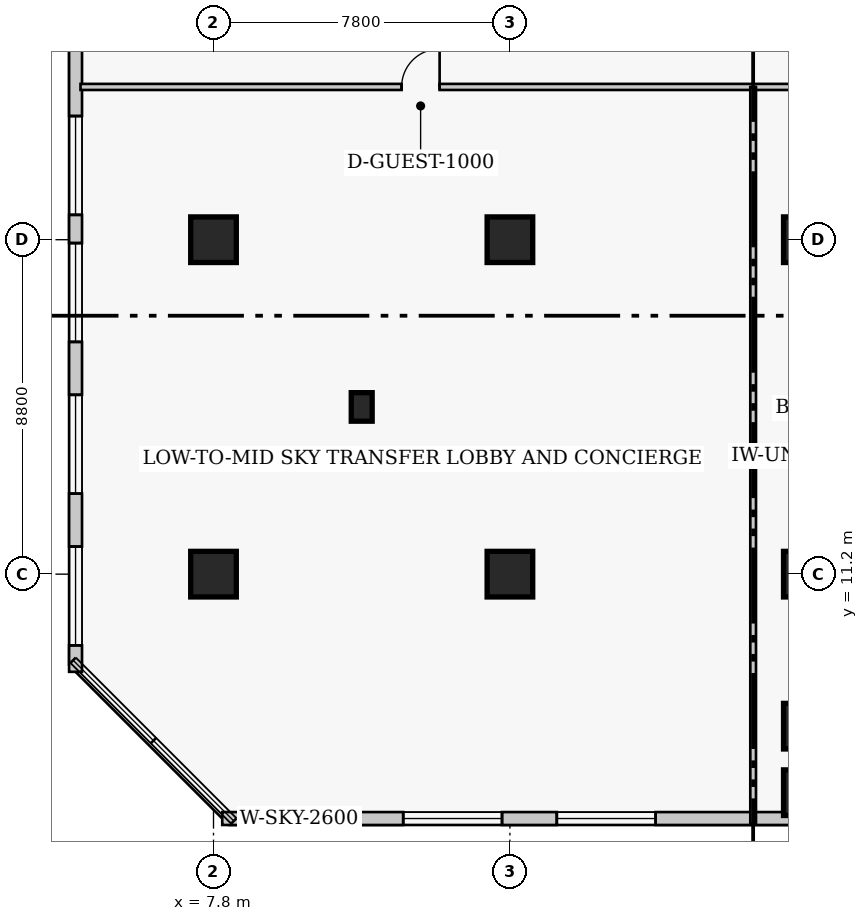
"""IFC4 building model, lengths in metres.
Left out: names, types, materials, properties, quantities, classifications, styles, units other than length and angle.
Written with IfcOpenShell. Run it as: python <this file> out.ifc"""

import sys

from ifc_helpers import new_model, si_unit, direction, frame, frame_2d, origin, origin_2d, place, context, subcontext, project, spatial, rectangle, extrude, element, fill, save


model = new_model("IFC4")
c1 = context("Model", 3, precision=1e-05, world=origin(), true_north=direction((0.0, 1.0)))
c2 = subcontext(c1, "Body", "Model", "MODEL_VIEW")
j1 = project(units=[si_unit("LENGTHUNIT", "METRE"), si_unit("PLANEANGLEUNIT", "RADIAN")], contexts=[c1])
p1 = place(None, origin())
s1 = spatial("IfcSite", under=j1, at=p1, CompositionType="ELEMENT")
p2 = place(p1, origin())
s2 = spatial("IfcBuilding", under=s1, at=p2, CompositionType="ELEMENT")
p3 = place(p2, frame((0.0, 0.0, 129.8)))
s3 = spatial("IfcBuildingStorey", under=s2, at=p3, CompositionType="ELEMENT", Elevation=129.8)
for number, where, z_axis, x_axis in (
    (1, (7.8, 11.2, 0.0), (0.0, 0.0, 1.0), (1.0, 0.0, 0.0)),
    (2, (7.8, 20.0, 0.0), (0.0, 0.0, 1.0), (1.0, 0.0, 0.0)),
    (3, (15.6, 11.2, 0.0), (0.0, 0.0, 1.0), (1.0, 0.0, 0.0)),
    (4, (15.6, 20.0, 0.0), (0.0, 0.0, 1.0), (1.0, 0.0, 0.0)),
    (5, (23.4, 11.2, 0.0), (0.0, 0.0, 1.0), (1.0, 0.0, 0.0)),
    (6, (23.4, 20.0, 0.0), (0.0, 0.0, 1.0), (1.0, 0.0, 0.0)),
    (7, (23.4, 7.2, 0.0), (0.0, 0.0, 1.0), (1.0, 0.0, 0.0)),
    (8, (23.4, 5.45, 0.0), (0.0, 0.0, 1.0), (1.0, 0.0, 0.0)),
):
    element("IfcColumn", number, at=place(p3, frame(where, z_axis=z_axis, x_axis=x_axis)), inside=s3, PredefinedType="COLUMN", context=c2, shape_type="SweptSolid", body=[
        extrude(rectangle(XDim=1.2, YDim=1.2, at=origin_2d()), origin(), (0.0, 0.0, 1.0), 4.8),
    ])
p4 = place(p3, frame((11.7, 15.6, 0.0), z_axis=(0.0, 0.0, 1.0), x_axis=(1.0, 0.0, 0.0)))
e9 = element("IfcColumn", 9, at=p4, inside=s3, PredefinedType="PILASTER", context=c2, shape_type="SweptSolid", body=[
    extrude(rectangle(XDim=0.55, YDim=0.75, at=origin_2d()), origin(), (0.0, 0.0, 1.0), 4.8),
])
p5 = place(p3, frame((8.03, 4.77, 0.0), z_axis=(0.0, 0.0, 1.0), x_axis=(1.0, 0.0, 0.0)))
e10 = element("IfcWall", 10, at=p5, inside=s3, PredefinedType="SOLIDWALL", context=c2, shape_type="SweptSolid", body=[
    extrude(rectangle(XDim=28.29, YDim=0.34, at=frame_2d((14.145, 0.0))), origin(), (0.0, 0.0, 1.0), 4.55),
])
p6 = place(p5, frame((0.721, 0.0, 0.65)))
e11 = element("IfcOpeningElement", 11, at=p6, cuts=e10, PredefinedType="OPENING", context=c2, shape_type="SweptSolid", body=[
    extrude(rectangle(XDim=2.6, YDim=2.2, at=frame_2d((1.3, 1.1))), frame((0.0, 0.18, 0.0), z_axis=(0.0, -1.0, 0.0), x_axis=(1.0, 0.0, 0.0)), (0.0, 0.0, 1.0), 0.36),
])
p7 = place(p5, frame((4.762, 0.0, 0.65)))
e12 = element("IfcOpeningElement", 12, at=p7, cuts=e10, PredefinedType="OPENING", context=c2, shape_type="SweptSolid", body=[
    extrude(rectangle(XDim=2.6, YDim=2.2, at=frame_2d((1.3, 1.1))), frame((0.0, 0.18, 0.0), z_axis=(0.0, -1.0, 0.0), x_axis=(1.0, 0.0, 0.0)), (0.0, 0.0, 1.0), 0.36),
])
p8 = place(p5, frame((8.804, 0.0, 0.65)))
e13 = element("IfcOpeningElement", 13, at=p8, cuts=e10, PredefinedType="OPENING", context=c2, shape_type="SweptSolid", body=[
    extrude(rectangle(XDim=2.6, YDim=2.2, at=frame_2d((1.3, 1.1))), frame((0.0, 0.18, 0.0), z_axis=(0.0, -1.0, 0.0), x_axis=(1.0, 0.0, 0.0)), (0.0, 0.0, 1.0), 0.36),
])
p9 = place(p5, frame((16.886, 0.0, 0.65)))
e14 = element("IfcOpeningElement", 14, at=p9, cuts=e10, PredefinedType="OPENING", context=c2, shape_type="SweptSolid", body=[
    extrude(rectangle(XDim=2.6, YDim=2.2, at=frame_2d((1.3, 1.1))), frame((0.0, 0.18, 0.0), z_axis=(0.0, -1.0, 0.0), x_axis=(1.0, 0.0, 0.0)), (0.0, 0.0, 1.0), 0.36),
])
p10 = place(p5, frame((24.969, 0.0, 0.65)))
e15 = element("IfcOpeningElement", 15, at=p10, cuts=e10, PredefinedType="OPENING", context=c2, shape_type="SweptSolid", body=[
    extrude(rectangle(XDim=2.6, YDim=2.2, at=frame_2d((1.3, 1.1))), frame((0.0, 0.18, 0.0), z_axis=(0.0, -1.0, 0.0), x_axis=(1.0, 0.0, 0.0)), (0.0, 0.0, 1.0), 0.36),
])
p11 = place(p3, frame((4.17, 40.57, 0.0), z_axis=(0.0, 0.0, 1.0), x_axis=(0.0, -1.0, 0.0)))
e16 = element("IfcWall", 16, at=p11, inside=s3, PredefinedType="SOLIDWALL", context=c2, shape_type="SweptSolid", body=[
    extrude(rectangle(XDim=31.94, YDim=0.34, at=frame_2d((15.97, 0.0))), origin(), (0.0, 0.0, 1.0), 4.55),
])
p12 = place(p11, frame((0.696, 0.0, 0.65)))
e17 = element("IfcOpeningElement", 17, at=p12, cuts=e16, PredefinedType="OPENING", context=c2, shape_type="SweptSolid", body=[
    extrude(rectangle(XDim=2.6, YDim=2.2, at=frame_2d((1.3, 1.1))), frame((0.0, 0.18, 0.0), z_axis=(0.0, -1.0, 0.0), x_axis=(1.0, 0.0, 0.0)), (0.0, 0.0, 1.0), 0.36),
])
p13 = place(p11, frame((4.689, 0.0, 0.65)))
e18 = element("IfcOpeningElement", 18, at=p13, cuts=e16, PredefinedType="OPENING", context=c2, shape_type="SweptSolid", body=[
    extrude(rectangle(XDim=2.6, YDim=2.2, at=frame_2d((1.3, 1.1))), frame((0.0, 0.18, 0.0), z_axis=(0.0, -1.0, 0.0), x_axis=(1.0, 0.0, 0.0)), (0.0, 0.0, 1.0), 0.36),
])
p14 = place(p11, frame((8.681, 0.0, 0.65)))
e19 = element("IfcOpeningElement", 19, at=p14, cuts=e16, PredefinedType="OPENING", context=c2, shape_type="SweptSolid", body=[
    extrude(rectangle(XDim=2.6, YDim=2.2, at=frame_2d((1.3, 1.1))), frame((0.0, 0.18, 0.0), z_axis=(0.0, -1.0, 0.0), x_axis=(1.0, 0.0, 0.0)), (0.0, 0.0, 1.0), 0.36),
])
p15 = place(p11, frame((17.316, 0.0, 0.65)))
e20 = element("IfcOpeningElement", 20, at=p15, cuts=e16, PredefinedType="OPENING", context=c2, shape_type="SweptSolid", body=[
    extrude(rectangle(XDim=2.6, YDim=2.2, at=frame_2d((1.3, 1.1))), frame((0.0, 0.18, 0.0), z_axis=(0.0, -1.0, 0.0), x_axis=(1.0, 0.0, 0.0)), (0.0, 0.0, 1.0), 0.36),
])
p16 = place(p11, frame((20.659, 0.0, 0.65)))
e21 = element("IfcOpeningElement", 21, at=p16, cuts=e16, PredefinedType="OPENING", context=c2, shape_type="SweptSolid", body=[
    extrude(rectangle(XDim=2.6, YDim=2.2, at=frame_2d((1.3, 1.1))), frame((0.0, 0.18, 0.0), z_axis=(0.0, -1.0, 0.0), x_axis=(1.0, 0.0, 0.0)), (0.0, 0.0, 1.0), 0.36),
])
p17 = place(p11, frame((24.651, 0.0, 0.65)))
e22 = element("IfcOpeningElement", 22, at=p17, cuts=e16, PredefinedType="OPENING", context=c2, shape_type="SweptSolid", body=[
    extrude(rectangle(XDim=2.6, YDim=2.2, at=frame_2d((1.3, 1.1))), frame((0.0, 0.18, 0.0), z_axis=(0.0, -1.0, 0.0), x_axis=(1.0, 0.0, 0.0)), (0.0, 0.0, 1.0), 0.36),
])
p18 = place(p11, frame((28.644, 0.0, 0.65)))
e23 = element("IfcOpeningElement", 23, at=p18, cuts=e16, PredefinedType="OPENING", context=c2, shape_type="SweptSolid", body=[
    extrude(rectangle(XDim=2.6, YDim=2.2, at=frame_2d((1.3, 1.1))), frame((0.0, 0.18, 0.0), z_axis=(0.0, -1.0, 0.0), x_axis=(1.0, 0.0, 0.0)), (0.0, 0.0, 1.0), 0.36),
])
p19 = place(p3, frame((4.3, 24.02, 0.0), z_axis=(0.0, 0.0, 1.0), x_axis=(1.0, 0.0, 0.0)))
e24 = element("IfcWall", 24, at=p19, inside=s3, PredefinedType="PARTITIONING", context=c2, shape_type="SweptSolid", body=[
    extrude(rectangle(XDim=69.4, YDim=0.16, at=frame_2d((34.7, 0.0))), origin(), (0.0, 0.0, 1.0), 4.55),
])
p20 = place(p19, frame((8.45, 0.0, 0.0)))
e25 = element("IfcOpeningElement", 25, at=p20, cuts=e24, PredefinedType="OPENING", context=c2, shape_type="SweptSolid", body=[
    extrude(rectangle(XDim=1.0, YDim=2.15, at=frame_2d((0.5, 1.075))), frame((0.0, 0.09, 0.0), z_axis=(0.0, -1.0, 0.0), x_axis=(1.0, 0.0, 0.0)), (0.0, 0.0, 1.0), 0.18),
])
p21 = place(p19, frame((25.2, 0.0, 0.0)))
e26 = element("IfcOpeningElement", 26, at=p21, cuts=e24, PredefinedType="OPENING", context=c2, shape_type="SweptSolid", body=[
    extrude(rectangle(XDim=1.0, YDim=2.15, at=frame_2d((0.5, 1.075))), frame((0.0, 0.09, 0.0), z_axis=(0.0, -1.0, 0.0), x_axis=(1.0, 0.0, 0.0)), (0.0, 0.0, 1.0), 0.18),
])
p22 = place(p19, frame((39.2, 0.0, 0.0)))
e27 = element("IfcOpeningElement", 27, at=p22, cuts=e24, PredefinedType="OPENING", context=c2, shape_type="SweptSolid", body=[
    extrude(rectangle(XDim=1.0, YDim=2.15, at=frame_2d((0.5, 1.075))), frame((0.0, 0.09, 0.0), z_axis=(0.0, -1.0, 0.0), x_axis=(1.0, 0.0, 0.0)), (0.0, 0.0, 1.0), 0.18),
])
p23 = place(p19, frame((56.95, 0.0, 0.0)))
e28 = element("IfcOpeningElement", 28, at=p23, cuts=e24, PredefinedType="OPENING", context=c2, shape_type="SweptSolid", body=[
    extrude(rectangle(XDim=1.0, YDim=2.15, at=frame_2d((0.5, 1.075))), frame((0.0, 0.09, 0.0), z_axis=(0.0, -1.0, 0.0), x_axis=(1.0, 0.0, 0.0)), (0.0, 0.0, 1.0), 0.18),
])
p24 = place(p3, frame((22.0, 4.62, 0.0), z_axis=(0.0, 0.0, 1.0), x_axis=(0.0, 1.0, 0.0)))
e29 = element("IfcWall", 29, at=p24, inside=s3, PredefinedType="PARTITIONING", context=c2, shape_type="SweptSolid", body=[
    extrude(rectangle(XDim=19.4, YDim=0.15, at=frame_2d((9.7, 0.0))), origin(), (0.0, 0.0, 1.0), 4.053),
])
p25 = place(p6, origin())
e30 = element("IfcWindow", 30, at=p25, inside=s3, PartitioningType="SINGLE_PANEL", PredefinedType="WINDOW", context=c2, shape_type="SweptSolid", body=[
    extrude(rectangle(XDim=2.6, YDim=2.2, at=frame_2d((1.3, 1.1))), frame((0.0, 0.03, 0.0), z_axis=(0.0, -1.0, 0.0), x_axis=(1.0, 0.0, 0.0)), (0.0, 0.0, 1.0), 0.06),
])
fill(e11, e30)
p26 = place(p7, origin())
e31 = element("IfcWindow", 31, at=p26, inside=s3, PartitioningType="SINGLE_PANEL", PredefinedType="WINDOW", context=c2, shape_type="SweptSolid", body=[
    extrude(rectangle(XDim=2.6, YDim=2.2, at=frame_2d((1.3, 1.1))), frame((0.0, 0.03, 0.0), z_axis=(0.0, -1.0, 0.0), x_axis=(1.0, 0.0, 0.0)), (0.0, 0.0, 1.0), 0.06),
])
fill(e12, e31)
p27 = place(p8, origin())
e32 = element("IfcWindow", 32, at=p27, inside=s3, PartitioningType="SINGLE_PANEL", PredefinedType="WINDOW", context=c2, shape_type="SweptSolid", body=[
    extrude(rectangle(XDim=2.6, YDim=2.2, at=frame_2d((1.3, 1.1))), frame((0.0, 0.03, 0.0), z_axis=(0.0, -1.0, 0.0), x_axis=(1.0, 0.0, 0.0)), (0.0, 0.0, 1.0), 0.06),
])
fill(e13, e32)
p28 = place(p15, origin())
e33 = element("IfcWindow", 33, at=p28, inside=s3, PartitioningType="SINGLE_PANEL", PredefinedType="WINDOW", context=c2, shape_type="SweptSolid", body=[
    extrude(rectangle(XDim=2.6, YDim=2.2, at=frame_2d((1.3, 1.1))), frame((0.0, 0.03, 0.0), z_axis=(0.0, -1.0, 0.0), x_axis=(1.0, 0.0, 0.0)), (0.0, 0.0, 1.0), 0.06),
])
fill(e20, e33)
p29 = place(p16, origin())
e34 = element("IfcWindow", 34, at=p29, inside=s3, PartitioningType="SINGLE_PANEL", PredefinedType="WINDOW", context=c2, shape_type="SweptSolid", body=[
    extrude(rectangle(XDim=2.6, YDim=2.2, at=frame_2d((1.3, 1.1))), frame((0.0, 0.03, 0.0), z_axis=(0.0, -1.0, 0.0), x_axis=(1.0, 0.0, 0.0)), (0.0, 0.0, 1.0), 0.06),
])
fill(e21, e34)
p30 = place(p17, origin())
e35 = element("IfcWindow", 35, at=p30, inside=s3, PartitioningType="SINGLE_PANEL", PredefinedType="WINDOW", context=c2, shape_type="SweptSolid", body=[
    extrude(rectangle(XDim=2.6, YDim=2.2, at=frame_2d((1.3, 1.1))), frame((0.0, 0.03, 0.0), z_axis=(0.0, -1.0, 0.0), x_axis=(1.0, 0.0, 0.0)), (0.0, 0.0, 1.0), 0.06),
])
fill(e22, e35)
p31 = place(p18, origin())
e36 = element("IfcWindow", 36, at=p31, inside=s3, PartitioningType="SINGLE_PANEL", PredefinedType="WINDOW", context=c2, shape_type="SweptSolid", body=[
    extrude(rectangle(XDim=2.6, YDim=2.2, at=frame_2d((1.3, 1.1))), frame((0.0, 0.03, 0.0), z_axis=(0.0, -1.0, 0.0), x_axis=(1.0, 0.0, 0.0)), (0.0, 0.0, 1.0), 0.06),
])
fill(e23, e36)
p32 = place(p20, origin())
e37 = element("IfcDoor", 37, at=p32, inside=s3, OperationType="SINGLE_SWING_RIGHT", PredefinedType="DOOR", context=c2, shape_type="SweptSolid", body=[
    extrude(rectangle(XDim=1.0, YDim=2.15, at=frame_2d((0.5, 1.075))), frame((0.0, 0.025, 0.0), z_axis=(0.0, -1.0, 0.0), x_axis=(1.0, 0.0, 0.0)), (0.0, 0.0, 1.0), 0.05),
])
fill(e25, e37)
save(model, sys.argv[1])
